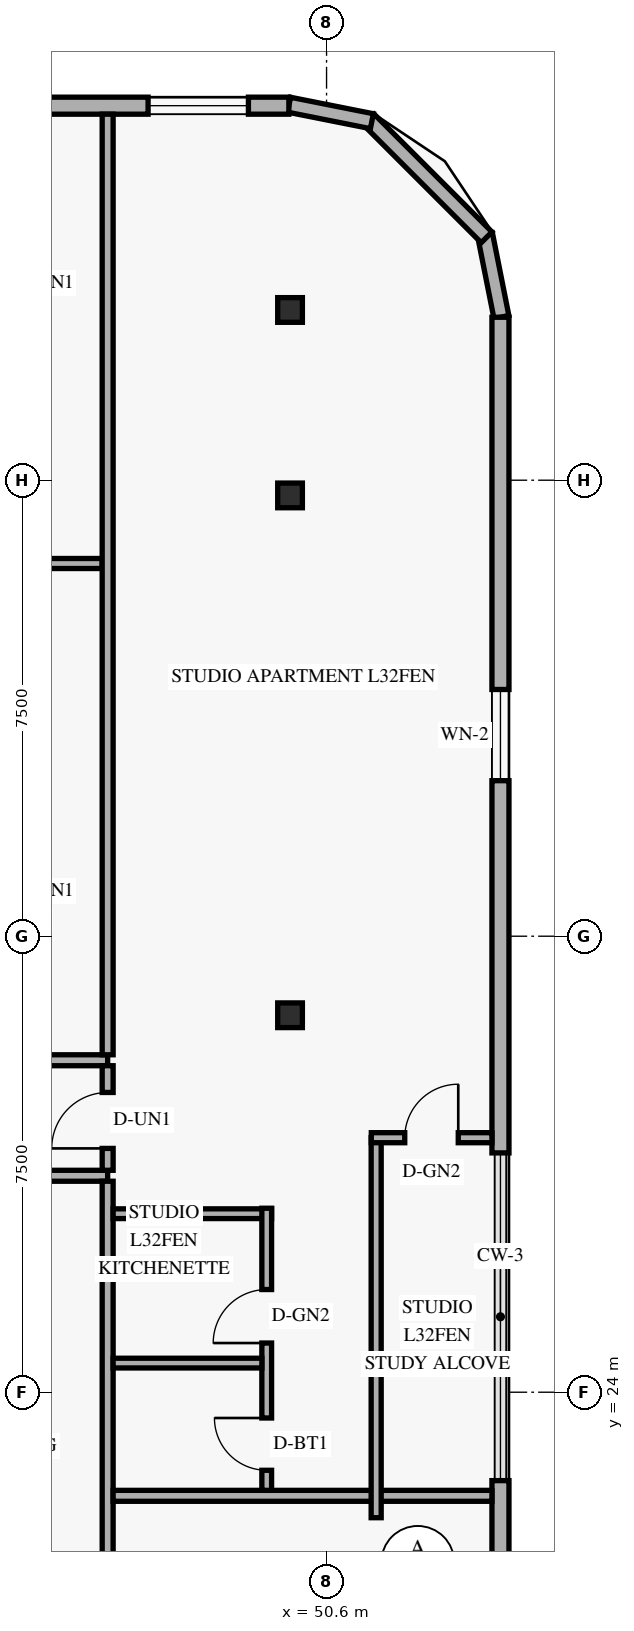
"""IFC4 building model, lengths in metres.
Left out: names, types, materials, properties, quantities, classifications, styles, units other than length and angle.
Written with IfcOpenShell. Run it as: python <this file> out.ifc"""

import sys

from ifc_helpers import new_model, si_unit, direction, frame, frame_2d, origin, origin_2d, place, context, subcontext, project, spatial, rectangle, hollow_rectangle, extrude, element, fill, save


model = new_model("IFC4")
c1 = context("Model", 3, precision=1e-05, world=origin(), true_north=direction((0.0, 1.0)))
c2 = subcontext(c1, "Body", "Model", "MODEL_VIEW")
j1 = project(units=[si_unit("LENGTHUNIT", "METRE"), si_unit("PLANEANGLEUNIT", "RADIAN")], contexts=[c1])
p1 = place(None, origin())
s1 = spatial("IfcSite", under=j1, at=p1, CompositionType="ELEMENT")
p2 = place(p1, origin())
s2 = spatial("IfcBuilding", under=s1, at=p2, CompositionType="ELEMENT")
p3 = place(p2, frame((0.0, 0.0, 124.8)))
s3 = spatial("IfcBuildingStorey", under=s2, at=p3, CompositionType="ELEMENT", Elevation=124.8)
for number, where, z_axis, x_axis in (
    (1, (49.895, 30.2, 0.0), (0.058, 0.0, 0.998), (0.0, 1.0, 0.0)),
    (2, (49.895, 38.75, 0.0), (0.058, 0.0, 0.998), (0.0, 1.0, 0.0)),
    (3, (49.895, 41.8, 0.0), (0.058, 0.0, 0.998), (0.0, 1.0, 0.0)),
):
    element("IfcColumn", number, at=place(p3, frame(where, z_axis=z_axis, x_axis=x_axis)), inside=s3, PredefinedType="COLUMN", context=c2, shape_type="SweptSolid", body=[
        extrude(hollow_rectangle(XDim=0.406, YDim=0.406, WallThickness=0.016, at=origin_2d()), origin(), (0.0, 0.0, 1.0), 3.606),
    ])
p4 = place(p3, frame((53.476, 41.684, 0.0), z_axis=(0.0, 0.0, 1.0), x_axis=(-0.195000137217, 0.980803214965, 0.0)))
e4 = element("IfcWall", 4, at=p4, inside=s3, PredefinedType="SOLIDWALL", context=c2, shape_type="SweptSolid", body=[
    extrude(rectangle(XDim=1.388, YDim=0.25, at=frame_2d((0.694, 0.0))), origin(), (0.0, 0.0, 1.0), 3.36),
])
p5 = place(p3, frame((53.232, 42.995, 0.0), z_axis=(0.0, 0.0, 1.0), x_axis=(-0.707151344399, 0.707062215165, 0.0)))
e5 = element("IfcWall", 5, at=p5, inside=s3, PredefinedType="SOLIDWALL", context=c2, shape_type="SweptSolid", body=[
    extrude(rectangle(XDim=2.739, YDim=0.25, at=frame_2d((1.37, 0.0))), origin(), (0.0, 0.0, 1.0), 3.36),
])
p6 = place(p3, frame((51.345, 44.905, 0.0), z_axis=(0.0, 0.0, 1.0), x_axis=(-0.980809899341, 0.19496651342, 0.0)))
e6 = element("IfcWall", 6, at=p6, inside=s3, PredefinedType="SOLIDWALL", context=c2, shape_type="SweptSolid", body=[
    extrude(rectangle(XDim=1.389, YDim=0.25, at=frame_2d((0.694, 0.0))), origin(), (0.0, 0.0, 1.0), 3.36),
])
p7 = place(p3, frame((53.46, 6.32, 0.0), z_axis=(0.0, 0.0, 1.0), x_axis=(0.0, 1.0, 0.0)))
e7 = element("IfcWall", 7, at=p7, inside=s3, PredefinedType="SOLIDWALL", context=c2, shape_type="SweptSolid", body=[
    extrude(rectangle(XDim=16.226, YDim=0.28, at=frame_2d((8.113, 0.0))), origin(), (0.0, 0.0, 1.0), 3.36),
])
p8 = place(p7, frame((7.363, 0.0, 0.85)))
e8 = element("IfcOpeningElement", 8, at=p8, cuts=e7, PredefinedType="OPENING", context=c2, shape_type="SweptSolid", body=[
    extrude(rectangle(XDim=1.5, YDim=1.55, at=frame_2d((0.75, 0.775))), frame((0.0, 0.15, 0.0), z_axis=(0.0, -1.0, 0.0), x_axis=(1.0, 0.0, 0.0)), (0.0, 0.0, 1.0), 0.3),
])
p9 = place(p3, frame((53.46, 27.936, 0.0), z_axis=(0.0, 0.0, 1.0), x_axis=(0.0, 1.0, 0.0)))
e9 = element("IfcWall", 9, at=p9, inside=s3, PredefinedType="SOLIDWALL", context=c2, shape_type="SweptSolid", body=[
    extrude(rectangle(XDim=13.744, YDim=0.28, at=frame_2d((6.872, 0.0))), origin(), (0.0, 0.0, 1.0), 3.36),
])
p10 = place(p9, frame((6.122, 0.0, 0.85)))
e10 = element("IfcOpeningElement", 10, at=p10, cuts=e9, PredefinedType="OPENING", context=c2, shape_type="SweptSolid", body=[
    extrude(rectangle(XDim=1.5, YDim=1.55, at=frame_2d((0.75, 0.775))), frame((0.0, 0.15, 0.0), z_axis=(0.0, -1.0, 0.0), x_axis=(1.0, 0.0, 0.0)), (0.0, 0.0, 1.0), 0.3),
])
p11 = place(p3, frame((49.98, 45.16, 0.0), z_axis=(0.0, 0.0, 1.0), x_axis=(-1.0, 0.0, 0.0)))
e11 = element("IfcWall", 11, at=p11, inside=s3, PredefinedType="SOLIDWALL", context=c2, shape_type="SweptSolid", body=[
    extrude(rectangle(XDim=36.56, YDim=0.28, at=frame_2d((18.28, 0.0))), origin(), (0.0, 0.0, 1.0), 3.36),
])
p12 = place(p11, frame((31.62, 0.0, 0.85)))
e12 = element("IfcOpeningElement", 12, at=p12, cuts=e11, PredefinedType="OPENING", context=c2, shape_type="SweptSolid", body=[
    extrude(rectangle(XDim=1.65, YDim=1.6, at=frame_2d((0.825, 0.8))), frame((0.0, 0.15, 0.0), z_axis=(0.0, -1.0, 0.0), x_axis=(1.0, 0.0, 0.0)), (0.0, 0.0, 1.0), 0.3),
])
p13 = place(p11, frame((23.555, 0.0, 0.85)))
e13 = element("IfcOpeningElement", 13, at=p13, cuts=e11, PredefinedType="OPENING", context=c2, shape_type="SweptSolid", body=[
    extrude(rectangle(XDim=1.65, YDim=1.6, at=frame_2d((0.825, 0.8))), frame((0.0, 0.15, 0.0), z_axis=(0.0, -1.0, 0.0), x_axis=(1.0, 0.0, 0.0)), (0.0, 0.0, 1.0), 0.3),
])
p14 = place(p11, frame((16.67, 0.0, 0.85)))
e14 = element("IfcOpeningElement", 14, at=p14, cuts=e11, PredefinedType="OPENING", context=c2, shape_type="SweptSolid", body=[
    extrude(rectangle(XDim=1.65, YDim=1.6, at=frame_2d((0.825, 0.8))), frame((0.0, 0.15, 0.0), z_axis=(0.0, -1.0, 0.0), x_axis=(1.0, 0.0, 0.0)), (0.0, 0.0, 1.0), 0.3),
])
p15 = place(p11, frame((10.44, 0.0, 0.85)))
e15 = element("IfcOpeningElement", 15, at=p15, cuts=e11, PredefinedType="OPENING", context=c2, shape_type="SweptSolid", body=[
    extrude(rectangle(XDim=1.65, YDim=1.6, at=frame_2d((0.825, 0.8))), frame((0.0, 0.15, 0.0), z_axis=(0.0, -1.0, 0.0), x_axis=(1.0, 0.0, 0.0)), (0.0, 0.0, 1.0), 0.3),
])
p16 = place(p11, frame((4.65, 0.0, 0.85)))
e16 = element("IfcOpeningElement", 16, at=p16, cuts=e11, PredefinedType="OPENING", context=c2, shape_type="SweptSolid", body=[
    extrude(rectangle(XDim=1.65, YDim=1.6, at=frame_2d((0.825, 0.8))), frame((0.0, 0.15, 0.0), z_axis=(0.0, -1.0, 0.0), x_axis=(1.0, 0.0, 0.0)), (0.0, 0.0, 1.0), 0.3),
])
p17 = place(p11, frame((0.665, 0.0, 0.85)))
e17 = element("IfcOpeningElement", 17, at=p17, cuts=e11, PredefinedType="OPENING", context=c2, shape_type="SweptSolid", body=[
    extrude(rectangle(XDim=1.65, YDim=1.6, at=frame_2d((0.825, 0.8))), frame((0.0, 0.15, 0.0), z_axis=(0.0, -1.0, 0.0), x_axis=(1.0, 0.0, 0.0)), (0.0, 0.0, 1.0), 0.3),
])
p18 = place(p3, frame((37.64, 27.56, 0.0), z_axis=(0.0, 0.0, 1.0), x_axis=(1.0, 0.0, 0.0)))
e18 = element("IfcWall", 18, at=p18, inside=s3, PredefinedType="STANDARD", context=c2, shape_type="SweptSolid", body=[
    extrude(rectangle(XDim=9.36, YDim=0.18, at=frame_2d((4.68, 0.0))), origin(), (0.0, 0.0, 1.0), 2.731),
])
p19 = place(p3, frame((35.51, 29.46, 0.0), z_axis=(0.0, 0.0, 1.0), x_axis=(1.0, 0.0, 0.0)))
e19 = element("IfcWall", 19, at=p19, inside=s3, PredefinedType="STANDARD", context=c2, shape_type="SweptSolid", body=[
    extrude(rectangle(XDim=11.49, YDim=0.18, at=frame_2d((5.745, 0.0))), origin(), (0.0, 0.0, 1.0), 2.731),
])
p20 = place(p19, frame((0.32, 0.0, 0.0)))
e20 = element("IfcOpeningElement", 20, at=p20, cuts=e19, PredefinedType="OPENING", context=c2, shape_type="SweptSolid", body=[
    extrude(rectangle(XDim=0.92, YDim=2.15, at=frame_2d((0.46, 1.075))), frame((0.0, 0.1, 0.0), z_axis=(0.0, -1.0, 0.0), x_axis=(1.0, 0.0, 0.0)), (0.0, 0.0, 1.0), 0.2),
])
p21 = place(p3, frame((42.09, 37.63, 0.0), z_axis=(0.0, 0.0, 1.0), x_axis=(1.0, 0.0, 0.0)))
e21 = element("IfcWall", 21, at=p21, inside=s3, PredefinedType="PARTITIONING", context=c2, shape_type="SweptSolid", body=[
    extrude(rectangle(XDim=4.82, YDim=0.165, at=frame_2d((2.41, 0.0))), origin(), (0.0, 0.0, 1.0), 2.731),
])
p22 = place(p3, frame((47.0, 27.65, 0.0), z_axis=(0.0, 0.0, 1.0), x_axis=(0.0, 1.0, 0.0)))
e22 = element("IfcWall", 22, at=p22, inside=s3, PredefinedType="STANDARD", context=c2, shape_type="SweptSolid", body=[
    extrude(rectangle(XDim=1.72, YDim=0.18, at=frame_2d((0.86, 0.0))), origin(), (0.0, 0.0, 1.0), 3.36),
])
p23 = place(p22, frame((0.36, 0.0, 0.0)))
e23 = element("IfcOpeningElement", 23, at=p23, cuts=e22, PredefinedType="OPENING", context=c2, shape_type="SweptSolid", body=[
    extrude(rectangle(XDim=0.92, YDim=2.15, at=frame_2d((0.46, 1.075))), frame((0.0, 0.1, 0.0), z_axis=(0.0, -1.0, 0.0), x_axis=(1.0, 0.0, 0.0)), (0.0, 0.0, 1.0), 0.2),
])
p24 = place(p3, frame((47.0, 17.37, 0.0), z_axis=(0.0, 0.0, 1.0), x_axis=(0.0, 1.0, 0.0)))
e24 = element("IfcWall", 24, at=p24, inside=s3, PredefinedType="PARTITIONING", context=c2, shape_type="SweptSolid", body=[
    extrude(rectangle(XDim=10.1, YDim=0.18, at=frame_2d((5.05, 0.0))), origin(), (0.0, 0.0, 1.0), 2.731),
])
p25 = place(p3, frame((47.0, 29.55, 0.0), z_axis=(0.0, 0.0, 1.0), x_axis=(0.0, 1.0, 0.0)))
e25 = element("IfcWall", 25, at=p25, inside=s3, PredefinedType="PARTITIONING", context=c2, shape_type="SweptSolid", body=[
    extrude(rectangle(XDim=15.47, YDim=0.18, at=frame_2d((7.735, 0.0))), origin(), (0.0, 0.0, 1.0), 2.731),
])
p26 = place(p3, frame((47.09, 22.296, 0.0), z_axis=(0.0, 0.0, 1.0), x_axis=(1.0, 0.0, 0.0)))
e26 = element("IfcWall", 26, at=p26, inside=s3, PredefinedType="PARTITIONING", context=c2, shape_type="SweptSolid", body=[
    extrude(rectangle(XDim=6.23, YDim=0.18, at=frame_2d((3.115, 0.0))), origin(), (0.0, 0.0, 1.0), 2.809),
])
p27 = place(p3, frame((47.09, 26.936, 0.0), z_axis=(0.0, 0.0, 1.0), x_axis=(1.0, 0.0, 0.0)))
e27 = element("IfcWall", 27, at=p27, inside=s3, PredefinedType="PLUMBINGWALL", context=c2, shape_type="SweptSolid", body=[
    extrude(rectangle(XDim=2.606, YDim=0.16, at=frame_2d((1.303, 0.0))), origin(), (0.0, 0.0, 1.0), 3.36),
])
p28 = place(p3, frame((49.616, 22.386, 0.0), z_axis=(0.0, 0.0, 1.0), x_axis=(0.0, 1.0, 0.0)))
e28 = element("IfcWall", 28, at=p28, inside=s3, PredefinedType="PLUMBINGWALL", context=c2, shape_type="SweptSolid", body=[
    extrude(rectangle(XDim=4.64, YDim=0.16, at=frame_2d((2.32, 0.0))), origin(), (0.0, 0.0, 1.0), 3.36),
])
p29 = place(p28, frame((0.33, 0.0, 0.0)))
e29 = element("IfcOpeningElement", 29, at=p29, cuts=e28, PredefinedType="OPENING", context=c2, shape_type="SweptSolid", body=[
    extrude(rectangle(XDim=0.86, YDim=2.12, at=frame_2d((0.43, 1.06))), frame((0.0, 0.09, 0.0), z_axis=(0.0, -1.0, 0.0), x_axis=(1.0, 0.0, 0.0)), (0.0, 0.0, 1.0), 0.18),
])
p30 = place(p28, frame((2.423, 0.0, 0.0)))
e30 = element("IfcOpeningElement", 30, at=p30, cuts=e28, PredefinedType="OPENING", context=c2, shape_type="SweptSolid", body=[
    extrude(rectangle(XDim=0.88, YDim=2.12, at=frame_2d((0.44, 1.06))), frame((0.0, 0.09, 0.0), z_axis=(0.0, -1.0, 0.0), x_axis=(1.0, 0.0, 0.0)), (0.0, 0.0, 1.0), 0.18),
])
p31 = place(p3, frame((47.09, 24.479, 0.0), z_axis=(0.0, 0.0, 1.0), x_axis=(1.0, 0.0, 0.0)))
e31 = element("IfcWall", 31, at=p31, inside=s3, PredefinedType="PLUMBINGWALL", context=c2, shape_type="SweptSolid", body=[
    extrude(rectangle(XDim=2.446, YDim=0.16, at=frame_2d((1.223, 0.0))), origin(), (0.0, 0.0, 1.0), 3.36),
])
p32 = place(p3, frame((51.416, 21.936, 0.0), z_axis=(0.0, 0.0, 1.0), x_axis=(0.0, 1.0, 0.0)))
e32 = element("IfcWall", 32, at=p32, inside=s3, PredefinedType="PARTITIONING", context=c2, shape_type="SweptSolid", body=[
    extrude(rectangle(XDim=6.25, YDim=0.165, at=frame_2d((3.125, 0.0))), origin(), (0.0, 0.0, 1.0), 3.36),
])
p33 = place(p3, frame((51.336, 28.186, 0.0), z_axis=(0.0, 0.0, 1.0), x_axis=(1.0, 0.0, 0.0)))
e33 = element("IfcWall", 33, at=p33, inside=s3, PredefinedType="PARTITIONING", context=c2, shape_type="SweptSolid", body=[
    extrude(rectangle(XDim=1.984, YDim=0.165, at=frame_2d((0.992, 0.0))), origin(), (0.0, 0.0, 1.0), 3.36),
])
p34 = place(p33, frame((0.55, 0.0, 0.0)))
e34 = element("IfcOpeningElement", 34, at=p34, cuts=e33, PredefinedType="OPENING", context=c2, shape_type="SweptSolid", body=[
    extrude(rectangle(XDim=0.88, YDim=2.12, at=frame_2d((0.44, 1.06))), frame((0.0, 0.093, 0.0), z_axis=(0.0, -1.0, 0.0), x_axis=(1.0, 0.0, 0.0)), (0.0, 0.0, 1.0), 0.185),
])
p35 = place(p10, origin())
e35 = element("IfcWindow", 35, at=p35, inside=s3, PartitioningType="SINGLE_PANEL", PredefinedType="WINDOW", context=c2, shape_type="SweptSolid", body=[
    extrude(rectangle(XDim=1.5, YDim=1.55, at=frame_2d((0.75, 0.775))), frame((0.0, 0.03, 0.0), z_axis=(0.0, -1.0, 0.0), x_axis=(1.0, 0.0, 0.0)), (0.0, 0.0, 1.0), 0.06),
])
fill(e10, e35)
p36 = place(p17, origin())
e36 = element("IfcWindow", 36, at=p36, inside=s3, PartitioningType="SINGLE_PANEL", PredefinedType="WINDOW", context=c2, shape_type="SweptSolid", body=[
    extrude(rectangle(XDim=1.65, YDim=1.6, at=frame_2d((0.825, 0.8))), frame((0.0, 0.03, 0.0), z_axis=(0.0, -1.0, 0.0), x_axis=(1.0, 0.0, 0.0)), (0.0, 0.0, 1.0), 0.06),
])
fill(e17, e36)
p37 = place(p34, origin())
e37 = element("IfcDoor", 37, at=p37, inside=s3, OperationType="SINGLE_SWING_RIGHT", PredefinedType="DOOR", context=c2, shape_type="SweptSolid", body=[
    extrude(rectangle(XDim=0.88, YDim=2.12, at=frame_2d((0.44, 1.06))), frame((0.0, 0.025, 0.0), z_axis=(0.0, -1.0, 0.0), x_axis=(1.0, 0.0, 0.0)), (0.0, 0.0, 1.0), 0.05),
])
fill(e34, e37)
p38 = place(p23, origin())
e38 = element("IfcDoor", 38, at=p38, inside=s3, OperationType="SINGLE_SWING_LEFT", PredefinedType="DOOR", context=c2, shape_type="SweptSolid", body=[
    extrude(rectangle(XDim=0.92, YDim=2.15, at=frame_2d((0.46, 1.075))), frame((0.0, 0.025, 0.0), z_axis=(0.0, -1.0, 0.0), x_axis=(1.0, 0.0, 0.0)), (0.0, 0.0, 1.0), 0.05),
])
fill(e23, e38)
p39 = place(p29, origin())
e39 = element("IfcDoor", 39, at=p39, inside=s3, OperationType="SINGLE_SWING_RIGHT", PredefinedType="DOOR", context=c2, shape_type="SweptSolid", body=[
    extrude(rectangle(XDim=0.86, YDim=2.12, at=frame_2d((0.43, 1.06))), frame((0.0, 0.025, 0.0), z_axis=(0.0, -1.0, 0.0), x_axis=(1.0, 0.0, 0.0)), (0.0, 0.0, 1.0), 0.05),
])
fill(e29, e39)
p40 = place(p30, origin())
e40 = element("IfcDoor", 40, at=p40, inside=s3, OperationType="SINGLE_SWING_LEFT", PredefinedType="DOOR", context=c2, shape_type="SweptSolid", body=[
    extrude(rectangle(XDim=0.88, YDim=2.12, at=frame_2d((0.44, 1.06))), frame((0.0, 0.025, 0.0), z_axis=(0.0, -1.0, 0.0), x_axis=(1.0, 0.0, 0.0)), (0.0, 0.0, 1.0), 0.05),
])
fill(e30, e40)
save(model, sys.argv[1])
